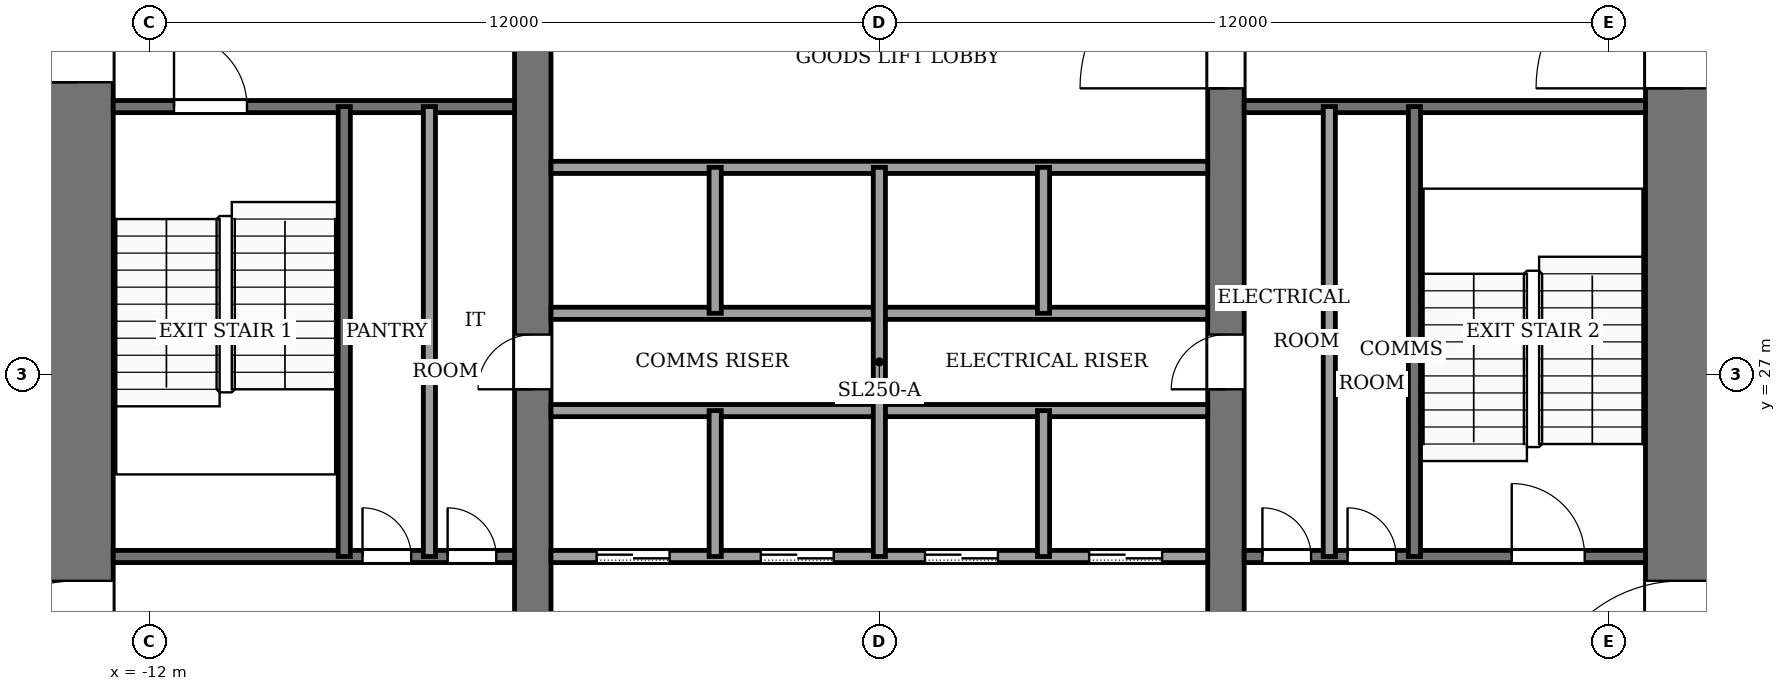
"""IFC4 building model, lengths in metres.
Left out: names, types, materials, properties, quantities, classifications, styles, units other than length and angle.
Written with IfcOpenShell. Run it as: python <this file> out.ifc"""

import sys

from ifc_helpers import new_model, si_unit, direction, frame, frame_2d, origin, place, context, subcontext, project, spatial, rectangle, extrude, element, fill, save


model = new_model("IFC4")
c1 = context("Model", 3, precision=1e-05, world=origin(), true_north=direction((0.0, 1.0)))
c2 = subcontext(c1, "Body", "Model", "MODEL_VIEW")
j1 = project(units=[si_unit("LENGTHUNIT", "METRE"), si_unit("PLANEANGLEUNIT", "RADIAN")], contexts=[c1])
p1 = place(None, origin())
s1 = spatial("IfcSite", under=j1, at=p1, CompositionType="ELEMENT")
p2 = place(p1, origin())
s2 = spatial("IfcBuilding", under=s1, at=p2, CompositionType="ELEMENT")
p3 = place(p2, frame((0.0, 0.0, 74.0)))
s3 = spatial("IfcBuildingStorey", under=s2, at=p3, CompositionType="ELEMENT", Elevation=74.0)
p4 = place(p3, frame((-13.2, 18.4, -0.13), z_axis=(0.0, 0.0, 1.0), x_axis=(0.0, 1.0, 0.0)))
e1 = element("IfcWall", 1, at=p4, inside=s3, PredefinedType="SHEAR", context=c2, shape_type="SweptSolid", body=[
    extrude(rectangle(XDim=19.2, YDim=1.2, at=frame_2d((9.6, 0.0))), origin(), (0.0, 0.0, 1.0), 4.0),
])
p5 = place(p4, frame((2.8, 0.0, 0.13)))
e2 = element("IfcOpeningElement", 2, at=p5, cuts=e1, PredefinedType="OPENING", context=c2, shape_type="SweptSolid", body=[
    extrude(rectangle(XDim=2.4, YDim=2.4, at=frame_2d((1.2, 1.2))), frame((0.0, 0.61, 0.0), z_axis=(0.0, -1.0, 0.0), x_axis=(1.0, 0.0, 0.0)), (0.0, 0.0, 1.0), 1.22),
])
p6 = place(p4, frame((13.4, 0.0, 0.13)))
e3 = element("IfcOpeningElement", 3, at=p6, cuts=e1, PredefinedType="OPENING", context=c2, shape_type="SweptSolid", body=[
    extrude(rectangle(XDim=1.4, YDim=2.2, at=frame_2d((0.7, 1.1))), frame((0.0, 0.61, 0.0), z_axis=(0.0, -1.0, 0.0), x_axis=(1.0, 0.0, 0.0)), (0.0, 0.0, 1.0), 1.22),
])
p7 = place(p3, frame((13.2, 18.4, -0.13), z_axis=(0.0, 0.0, 1.0), x_axis=(0.0, 1.0, 0.0)))
e4 = element("IfcWall", 4, at=p7, inside=s3, PredefinedType="SHEAR", context=c2, shape_type="SweptSolid", body=[
    extrude(rectangle(XDim=19.2, YDim=1.2, at=frame_2d((9.6, 0.0))), origin(), (0.0, 0.0, 1.0), 4.0),
])
p8 = place(p7, frame((2.8, 0.0, 0.13)))
e5 = element("IfcOpeningElement", 5, at=p8, cuts=e4, PredefinedType="OPENING", context=c2, shape_type="SweptSolid", body=[
    extrude(rectangle(XDim=2.4, YDim=2.4, at=frame_2d((1.2, 1.2))), frame((0.0, 0.61, 0.0), z_axis=(0.0, -1.0, 0.0), x_axis=(1.0, 0.0, 0.0)), (0.0, 0.0, 1.0), 1.22),
])
p9 = place(p7, frame((13.3, 0.0, 0.13)))
e6 = element("IfcOpeningElement", 6, at=p9, cuts=e4, PredefinedType="OPENING", context=c2, shape_type="SweptSolid", body=[
    extrude(rectangle(XDim=2.4, YDim=2.4, at=frame_2d((1.2, 1.2))), frame((0.0, 0.61, 0.0), z_axis=(0.0, -1.0, 0.0), x_axis=(1.0, 0.0, 0.0)), (0.0, 0.0, 1.0), 1.22),
])
p10 = place(p3, frame((-5.7, 18.4, -0.13), z_axis=(0.0, 0.0, 1.0), x_axis=(0.0, 1.0, 0.0)))
e7 = element("IfcWall", 7, at=p10, inside=s3, PredefinedType="SHEAR", context=c2, shape_type="SweptSolid", body=[
    extrude(rectangle(XDim=19.2, YDim=0.6, at=frame_2d((9.6, 0.0))), origin(), (0.0, 0.0, 1.0), 4.0),
])
p11 = place(p10, frame((8.35, 0.0, 0.13)))
e8 = element("IfcOpeningElement", 8, at=p11, cuts=e7, PredefinedType="OPENING", context=c2, shape_type="SweptSolid", body=[
    extrude(rectangle(XDim=0.9, YDim=2.1, at=frame_2d((0.45, 1.05))), frame((0.0, 0.31, 0.0), z_axis=(0.0, -1.0, 0.0), x_axis=(1.0, 0.0, 0.0)), (0.0, 0.0, 1.0), 0.62),
])
p12 = place(p3, frame((5.7, 18.4, -0.13), z_axis=(0.0, 0.0, 1.0), x_axis=(0.0, 1.0, 0.0)))
e9 = element("IfcWall", 9, at=p12, inside=s3, PredefinedType="SHEAR", context=c2, shape_type="SweptSolid", body=[
    extrude(rectangle(XDim=19.2, YDim=0.6, at=frame_2d((9.6, 0.0))), origin(), (0.0, 0.0, 1.0), 4.0),
])
p13 = place(p12, frame((8.35, 0.0, 0.13)))
e10 = element("IfcOpeningElement", 10, at=p13, cuts=e9, PredefinedType="OPENING", context=c2, shape_type="SweptSolid", body=[
    extrude(rectangle(XDim=0.9, YDim=2.1, at=frame_2d((0.45, 1.05))), frame((0.0, 0.31, 0.0), z_axis=(0.0, -1.0, 0.0), x_axis=(1.0, 0.0, 0.0)), (0.0, 0.0, 1.0), 0.62),
])
p14 = place(p12, frame((13.3, 0.0, 0.13)))
e11 = element("IfcOpeningElement", 11, at=p14, cuts=e9, PredefinedType="OPENING", context=c2, shape_type="SweptSolid", body=[
    extrude(rectangle(XDim=2.4, YDim=2.4, at=frame_2d((1.2, 1.2))), frame((0.0, 0.31, 0.0), z_axis=(0.0, -1.0, 0.0), x_axis=(1.0, 0.0, 0.0)), (0.0, 0.0, 1.0), 0.62),
])
p15 = place(p3, frame((-12.6, 24.0, 0.0), z_axis=(0.0, 0.0, 1.0), x_axis=(1.0, 0.0, 0.0)))
e12 = element("IfcWall", 12, at=p15, inside=s3, PredefinedType="PARTITIONING", context=c2, shape_type="SweptSolid", body=[
    extrude(rectangle(XDim=6.6, YDim=0.2, at=frame_2d((3.3, 0.0))), origin(), (0.0, 0.0, 1.0), 3.87),
])
p16 = place(p15, frame((4.1, 0.0, 0.0)))
e13 = element("IfcOpeningElement", 13, at=p16, cuts=e12, PredefinedType="OPENING", context=c2, shape_type="SweptSolid", body=[
    extrude(rectangle(XDim=0.8, YDim=2.1, at=frame_2d((0.4, 1.05))), frame((0.0, 0.11, 0.0), z_axis=(0.0, -1.0, 0.0), x_axis=(1.0, 0.0, 0.0)), (0.0, 0.0, 1.0), 0.22),
])
p17 = place(p15, frame((5.5, 0.0, 0.0)))
e14 = element("IfcOpeningElement", 14, at=p17, cuts=e12, PredefinedType="OPENING", context=c2, shape_type="SweptSolid", body=[
    extrude(rectangle(XDim=0.8, YDim=2.1, at=frame_2d((0.4, 1.05))), frame((0.0, 0.11, 0.0), z_axis=(0.0, -1.0, 0.0), x_axis=(1.0, 0.0, 0.0)), (0.0, 0.0, 1.0), 0.22),
])
p18 = place(p3, frame((-5.4, 24.0, 0.0), z_axis=(0.0, 0.0, 1.0), x_axis=(1.0, 0.0, 0.0)))
e15 = element("IfcWall", 15, at=p18, inside=s3, PredefinedType="PARTITIONING", context=c2, shape_type="SweptSolid", body=[
    extrude(rectangle(XDim=10.8, YDim=0.2, at=frame_2d((5.4, 0.0))), origin(), (0.0, 0.0, 1.0), 3.87),
])
p19 = place(p18, frame((0.75, 0.0, 0.0)))
e16 = element("IfcOpeningElement", 16, at=p19, cuts=e15, PredefinedType="OPENING", context=c2, shape_type="SweptSolid", body=[
    extrude(rectangle(XDim=1.2, YDim=2.2, at=frame_2d((0.6, 1.1))), frame((0.0, 0.11, 0.0), z_axis=(0.0, -1.0, 0.0), x_axis=(1.0, 0.0, 0.0)), (0.0, 0.0, 1.0), 0.22),
])
p20 = place(p18, frame((3.45, 0.0, 0.0)))
e17 = element("IfcOpeningElement", 17, at=p20, cuts=e15, PredefinedType="OPENING", context=c2, shape_type="SweptSolid", body=[
    extrude(rectangle(XDim=1.2, YDim=2.2, at=frame_2d((0.6, 1.1))), frame((0.0, 0.11, 0.0), z_axis=(0.0, -1.0, 0.0), x_axis=(1.0, 0.0, 0.0)), (0.0, 0.0, 1.0), 0.22),
])
p21 = place(p18, frame((6.15, 0.0, 0.0)))
e18 = element("IfcOpeningElement", 18, at=p21, cuts=e15, PredefinedType="OPENING", context=c2, shape_type="SweptSolid", body=[
    extrude(rectangle(XDim=1.2, YDim=2.2, at=frame_2d((0.6, 1.1))), frame((0.0, 0.11, 0.0), z_axis=(0.0, -1.0, 0.0), x_axis=(1.0, 0.0, 0.0)), (0.0, 0.0, 1.0), 0.22),
])
p22 = place(p18, frame((8.85, 0.0, 0.0)))
e19 = element("IfcOpeningElement", 19, at=p22, cuts=e15, PredefinedType="OPENING", context=c2, shape_type="SweptSolid", body=[
    extrude(rectangle(XDim=1.2, YDim=2.2, at=frame_2d((0.6, 1.1))), frame((0.0, 0.11, 0.0), z_axis=(0.0, -1.0, 0.0), x_axis=(1.0, 0.0, 0.0)), (0.0, 0.0, 1.0), 0.22),
])
p23 = place(p3, frame((6.0, 24.0, 0.0), z_axis=(0.0, 0.0, 1.0), x_axis=(1.0, 0.0, 0.0)))
e20 = element("IfcWall", 20, at=p23, inside=s3, PredefinedType="PARTITIONING", context=c2, shape_type="SweptSolid", body=[
    extrude(rectangle(XDim=6.6, YDim=0.2, at=frame_2d((3.3, 0.0))), origin(), (0.0, 0.0, 1.0), 3.87),
])
p24 = place(p23, frame((0.3, 0.0, 0.0)))
e21 = element("IfcOpeningElement", 21, at=p24, cuts=e20, PredefinedType="OPENING", context=c2, shape_type="SweptSolid", body=[
    extrude(rectangle(XDim=0.8, YDim=2.1, at=frame_2d((0.4, 1.05))), frame((0.0, 0.11, 0.0), z_axis=(0.0, -1.0, 0.0), x_axis=(1.0, 0.0, 0.0)), (0.0, 0.0, 1.0), 0.22),
])
p25 = place(p23, frame((1.7, 0.0, 0.0)))
e22 = element("IfcOpeningElement", 22, at=p25, cuts=e20, PredefinedType="OPENING", context=c2, shape_type="SweptSolid", body=[
    extrude(rectangle(XDim=0.8, YDim=2.1, at=frame_2d((0.4, 1.05))), frame((0.0, 0.11, 0.0), z_axis=(0.0, -1.0, 0.0), x_axis=(1.0, 0.0, 0.0)), (0.0, 0.0, 1.0), 0.22),
])
p26 = place(p23, frame((4.4, 0.0, 0.0)))
e23 = element("IfcOpeningElement", 23, at=p26, cuts=e20, PredefinedType="OPENING", context=c2, shape_type="SweptSolid", body=[
    extrude(rectangle(XDim=1.2, YDim=2.2, at=frame_2d((0.6, 1.1))), frame((0.0, 0.11, 0.0), z_axis=(0.0, -1.0, 0.0), x_axis=(1.0, 0.0, 0.0)), (0.0, 0.0, 1.0), 0.22),
])
for number, where, z_axis, x_axis in (
    (24, (-5.4, 26.4, 0.0), (0.0, 0.0, 1.0), (1.0, 0.0, 0.0)),
    (25, (-5.4, 28.0, 0.0), (0.0, 0.0, 1.0), (1.0, 0.0, 0.0)),
    (26, (-5.4, 30.4, 0.0), (0.0, 0.0, 1.0), (1.0, 0.0, 0.0)),
):
    element("IfcWall", number, at=place(p3, frame(where, z_axis=z_axis, x_axis=x_axis)), inside=s3, PredefinedType="PARTITIONING", context=c2, shape_type="SweptSolid", body=[
        extrude(rectangle(XDim=10.8, YDim=0.2, at=frame_2d((5.4, 0.0))), origin(), (0.0, 0.0, 1.0), 3.87),
    ])
p27 = place(p3, frame((-12.6, 31.4, 0.0), z_axis=(0.0, 0.0, 1.0), x_axis=(1.0, 0.0, 0.0)))
e27 = element("IfcWall", 27, at=p27, inside=s3, PredefinedType="PARTITIONING", context=c2, shape_type="SweptSolid", body=[
    extrude(rectangle(XDim=6.6, YDim=0.2, at=frame_2d((3.3, 0.0))), origin(), (0.0, 0.0, 1.0), 3.87),
])
p28 = place(p27, frame((1.0, 0.0, 0.0)))
e28 = element("IfcOpeningElement", 28, at=p28, cuts=e27, PredefinedType="OPENING", context=c2, shape_type="SweptSolid", body=[
    extrude(rectangle(XDim=1.2, YDim=2.2, at=frame_2d((0.6, 1.1))), frame((0.0, 0.11, 0.0), z_axis=(0.0, -1.0, 0.0), x_axis=(1.0, 0.0, 0.0)), (0.0, 0.0, 1.0), 0.22),
])
p29 = place(p3, frame((6.0, 31.4, 0.0), z_axis=(0.0, 0.0, 1.0), x_axis=(1.0, 0.0, 0.0)))
e29 = element("IfcWall", 29, at=p29, inside=s3, PredefinedType="PARTITIONING", context=c2, shape_type="SweptSolid", body=[
    extrude(rectangle(XDim=6.6, YDim=0.2, at=frame_2d((3.3, 0.0))), origin(), (0.0, 0.0, 1.0), 3.87),
])
for number, where, z_axis, x_axis in (
    (30, (-8.8, 24.0, 0.0), (0.0, 0.0, 1.0), (0.0, 1.0, 0.0)),
    (31, (-7.4, 24.0, 0.0), (0.0, 0.0, 1.0), (0.0, 1.0, 0.0)),
):
    element("IfcWall", number, at=place(p3, frame(where, z_axis=z_axis, x_axis=x_axis)), inside=s3, PredefinedType="PARTITIONING", context=c2, shape_type="SweptSolid", body=[
        extrude(rectangle(XDim=7.4, YDim=0.2, at=frame_2d((3.7, 0.0))), origin(), (0.0, 0.0, 1.0), 3.87),
    ])
for number, where, z_axis, x_axis in (
    (32, (-2.7, 24.0, 0.0), (0.0, 0.0, 1.0), (0.0, 1.0, 0.0)),
    (33, (-2.7, 28.0, 0.0), (0.0, 0.0, 1.0), (0.0, 1.0, 0.0)),
):
    element("IfcWall", number, at=place(p3, frame(where, z_axis=z_axis, x_axis=x_axis)), inside=s3, PredefinedType="PARTITIONING", context=c2, shape_type="SweptSolid", body=[
        extrude(rectangle(XDim=2.4, YDim=0.2, at=frame_2d((1.2, 0.0))), origin(), (0.0, 0.0, 1.0), 3.87),
    ])
p30 = place(p3, frame((0.0, 24.0, 0.0), z_axis=(0.0, 0.0, 1.0), x_axis=(0.0, 1.0, 0.0)))
e34 = element("IfcWall", 34, at=p30, inside=s3, PredefinedType="PARTITIONING", context=c2, shape_type="SweptSolid", body=[
    extrude(rectangle(XDim=6.4, YDim=0.2, at=frame_2d((3.2, 0.0))), origin(), (0.0, 0.0, 1.0), 3.87),
])
for number, where, z_axis, x_axis in (
    (35, (2.7, 24.0, 0.0), (0.0, 0.0, 1.0), (0.0, 1.0, 0.0)),
    (36, (2.7, 28.0, 0.0), (0.0, 0.0, 1.0), (0.0, 1.0, 0.0)),
):
    element("IfcWall", number, at=place(p3, frame(where, z_axis=z_axis, x_axis=x_axis)), inside=s3, PredefinedType="PARTITIONING", context=c2, shape_type="SweptSolid", body=[
        extrude(rectangle(XDim=2.4, YDim=0.2, at=frame_2d((1.2, 0.0))), origin(), (0.0, 0.0, 1.0), 3.87),
    ])
for number, where, z_axis, x_axis in (
    (37, (7.4, 24.0, 0.0), (0.0, 0.0, 1.0), (0.0, 1.0, 0.0)),
    (38, (8.8, 24.0, 0.0), (0.0, 0.0, 1.0), (0.0, 1.0, 0.0)),
):
    element("IfcWall", number, at=place(p3, frame(where, z_axis=z_axis, x_axis=x_axis)), inside=s3, PredefinedType="PARTITIONING", context=c2, shape_type="SweptSolid", body=[
        extrude(rectangle(XDim=7.4, YDim=0.2, at=frame_2d((3.7, 0.0))), origin(), (0.0, 0.0, 1.0), 3.87),
    ])
p31 = place(p19, origin())
e39 = element("IfcDoor", 39, at=p31, inside=s3, OperationType="SLIDING_TO_LEFT", PredefinedType="DOOR", context=c2, shape_type="SweptSolid", body=[
    extrude(rectangle(XDim=1.2, YDim=2.2, at=frame_2d((0.6, 1.1))), frame((0.0, 0.025, 0.0), z_axis=(0.0, -1.0, 0.0), x_axis=(1.0, 0.0, 0.0)), (0.0, 0.0, 1.0), 0.05),
])
fill(e16, e39)
p32 = place(p20, origin())
e40 = element("IfcDoor", 40, at=p32, inside=s3, OperationType="SLIDING_TO_LEFT", PredefinedType="DOOR", context=c2, shape_type="SweptSolid", body=[
    extrude(rectangle(XDim=1.2, YDim=2.2, at=frame_2d((0.6, 1.1))), frame((0.0, 0.025, 0.0), z_axis=(0.0, -1.0, 0.0), x_axis=(1.0, 0.0, 0.0)), (0.0, 0.0, 1.0), 0.05),
])
fill(e17, e40)
p33 = place(p21, origin())
e41 = element("IfcDoor", 41, at=p33, inside=s3, OperationType="SLIDING_TO_LEFT", PredefinedType="DOOR", context=c2, shape_type="SweptSolid", body=[
    extrude(rectangle(XDim=1.2, YDim=2.2, at=frame_2d((0.6, 1.1))), frame((0.0, 0.025, 0.0), z_axis=(0.0, -1.0, 0.0), x_axis=(1.0, 0.0, 0.0)), (0.0, 0.0, 1.0), 0.05),
])
fill(e18, e41)
p34 = place(p22, origin())
e42 = element("IfcDoor", 42, at=p34, inside=s3, OperationType="SLIDING_TO_LEFT", PredefinedType="DOOR", context=c2, shape_type="SweptSolid", body=[
    extrude(rectangle(XDim=1.2, YDim=2.2, at=frame_2d((0.6, 1.1))), frame((0.0, 0.025, 0.0), z_axis=(0.0, -1.0, 0.0), x_axis=(1.0, 0.0, 0.0)), (0.0, 0.0, 1.0), 0.05),
])
fill(e19, e42)
p35 = place(p16, origin())
e43 = element("IfcDoor", 43, at=p35, inside=s3, OperationType="SINGLE_SWING_RIGHT", PredefinedType="DOOR", context=c2, shape_type="SweptSolid", body=[
    extrude(rectangle(XDim=0.8, YDim=2.1, at=frame_2d((0.4, 1.05))), frame((0.0, 0.025, 0.0), z_axis=(0.0, -1.0, 0.0), x_axis=(1.0, 0.0, 0.0)), (0.0, 0.0, 1.0), 0.05),
])
fill(e13, e43)
p36 = place(p17, origin())
e44 = element("IfcDoor", 44, at=p36, inside=s3, OperationType="SINGLE_SWING_LEFT", PredefinedType="DOOR", context=c2, shape_type="SweptSolid", body=[
    extrude(rectangle(XDim=0.8, YDim=2.1, at=frame_2d((0.4, 1.05))), frame((0.0, 0.025, 0.0), z_axis=(0.0, -1.0, 0.0), x_axis=(1.0, 0.0, 0.0)), (0.0, 0.0, 1.0), 0.05),
])
fill(e14, e44)
p37 = place(p24, origin())
e45 = element("IfcDoor", 45, at=p37, inside=s3, OperationType="SINGLE_SWING_RIGHT", PredefinedType="DOOR", context=c2, shape_type="SweptSolid", body=[
    extrude(rectangle(XDim=0.8, YDim=2.1, at=frame_2d((0.4, 1.05))), frame((0.0, 0.025, 0.0), z_axis=(0.0, -1.0, 0.0), x_axis=(1.0, 0.0, 0.0)), (0.0, 0.0, 1.0), 0.05),
])
fill(e21, e45)
p38 = place(p25, origin())
e46 = element("IfcDoor", 46, at=p38, inside=s3, OperationType="SINGLE_SWING_LEFT", PredefinedType="DOOR", context=c2, shape_type="SweptSolid", body=[
    extrude(rectangle(XDim=0.8, YDim=2.1, at=frame_2d((0.4, 1.05))), frame((0.0, 0.025, 0.0), z_axis=(0.0, -1.0, 0.0), x_axis=(1.0, 0.0, 0.0)), (0.0, 0.0, 1.0), 0.05),
])
fill(e22, e46)
p39 = place(p11, origin())
e47 = element("IfcDoor", 47, at=p39, inside=s3, OperationType="SINGLE_SWING_LEFT", PredefinedType="DOOR", context=c2, shape_type="SweptSolid", body=[
    extrude(rectangle(XDim=0.9, YDim=2.1, at=frame_2d((0.45, 1.05))), frame((0.0, 0.025, 0.0), z_axis=(0.0, -1.0, 0.0), x_axis=(1.0, 0.0, 0.0)), (0.0, 0.0, 1.0), 0.05),
])
fill(e8, e47)
p40 = place(p13, origin())
e48 = element("IfcDoor", 48, at=p40, inside=s3, OperationType="SINGLE_SWING_RIGHT", PredefinedType="DOOR", context=c2, shape_type="SweptSolid", body=[
    extrude(rectangle(XDim=0.9, YDim=2.1, at=frame_2d((0.45, 1.05))), frame((0.0, 0.025, 0.0), z_axis=(0.0, -1.0, 0.0), x_axis=(1.0, 0.0, 0.0)), (0.0, 0.0, 1.0), 0.05),
])
fill(e10, e48)
p41 = place(p28, origin())
e49 = element("IfcDoor", 49, at=p41, inside=s3, OperationType="SINGLE_SWING_RIGHT", PredefinedType="DOOR", context=c2, shape_type="SweptSolid", body=[
    extrude(rectangle(XDim=1.2, YDim=2.2, at=frame_2d((0.6, 1.1))), frame((0.0, 0.025, 0.0), z_axis=(0.0, -1.0, 0.0), x_axis=(1.0, 0.0, 0.0)), (0.0, 0.0, 1.0), 0.05),
])
fill(e28, e49)
p42 = place(p26, origin())
e50 = element("IfcDoor", 50, at=p42, inside=s3, OperationType="SINGLE_SWING_LEFT", PredefinedType="DOOR", context=c2, shape_type="SweptSolid", body=[
    extrude(rectangle(XDim=1.2, YDim=2.2, at=frame_2d((0.6, 1.1))), frame((0.0, 0.025, 0.0), z_axis=(0.0, -1.0, 0.0), x_axis=(1.0, 0.0, 0.0)), (0.0, 0.0, 1.0), 0.05),
])
fill(e23, e50)
p43 = place(p14, origin())
e51 = element("IfcDoor", 51, at=p43, inside=s3, OperationType="DOUBLE_DOOR_SINGLE_SWING", PredefinedType="DOOR", context=c2, shape_type="SweptSolid", body=[
    extrude(rectangle(XDim=2.4, YDim=2.4, at=frame_2d((1.2, 1.2))), frame((0.0, 0.025, 0.0), z_axis=(0.0, -1.0, 0.0), x_axis=(1.0, 0.0, 0.0)), (0.0, 0.0, 1.0), 0.05),
])
fill(e11, e51)
p44 = place(p5, origin())
e52 = element("IfcDoor", 52, at=p44, inside=s3, OperationType="DOUBLE_DOOR_SINGLE_SWING", PredefinedType="DOOR", context=c2, shape_type="SweptSolid", body=[
    extrude(rectangle(XDim=2.4, YDim=2.4, at=frame_2d((1.2, 1.2))), frame((0.0, 0.025, 0.0), z_axis=(0.0, -1.0, 0.0), x_axis=(1.0, 0.0, 0.0)), (0.0, 0.0, 1.0), 0.05),
])
fill(e2, e52)
p45 = place(p8, origin())
e53 = element("IfcDoor", 53, at=p45, inside=s3, OperationType="DOUBLE_DOOR_SINGLE_SWING", PredefinedType="DOOR", context=c2, shape_type="SweptSolid", body=[
    extrude(rectangle(XDim=2.4, YDim=2.4, at=frame_2d((1.2, 1.2))), frame((0.0, 0.025, 0.0), z_axis=(0.0, -1.0, 0.0), x_axis=(1.0, 0.0, 0.0)), (0.0, 0.0, 1.0), 0.05),
])
fill(e5, e53)
p46 = place(p9, origin())
e54 = element("IfcDoor", 54, at=p46, inside=s3, OperationType="DOUBLE_DOOR_SINGLE_SWING", PredefinedType="DOOR", context=c2, shape_type="SweptSolid", body=[
    extrude(rectangle(XDim=2.4, YDim=2.4, at=frame_2d((1.2, 1.2))), frame((0.0, 0.025, 0.0), z_axis=(0.0, -1.0, 0.0), x_axis=(1.0, 0.0, 0.0)), (0.0, 0.0, 1.0), 0.05),
])
fill(e6, e54)
p47 = place(p6, origin())
e55 = element("IfcDoor", 55, at=p47, inside=s3, OperationType="SINGLE_SWING_RIGHT", PredefinedType="DOOR", context=c2, shape_type="SweptSolid", body=[
    extrude(rectangle(XDim=1.4, YDim=2.2, at=frame_2d((0.7, 1.1))), frame((0.0, 0.025, 0.0), z_axis=(0.0, -1.0, 0.0), x_axis=(1.0, 0.0, 0.0)), (0.0, 0.0, 1.0), 0.05),
])
fill(e3, e55)
save(model, sys.argv[1])
